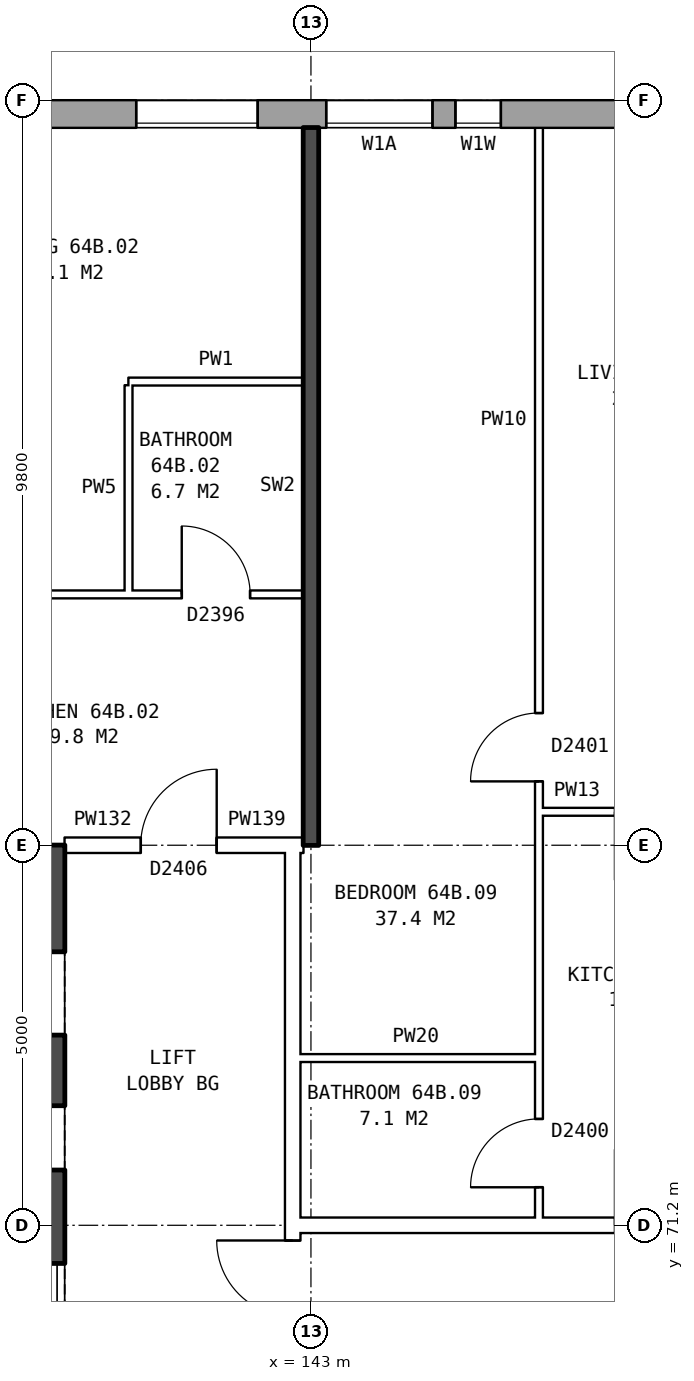
"""IFC4 building model, lengths in metres.
Left out: names, types, materials, properties, quantities, classifications, styles, units other than length and angle.
Written with IfcOpenShell. Run it as: python <this file> out.ifc"""

import sys

from ifc_helpers import new_model, si_unit, direction, frame, frame_2d, origin, place, context, subcontext, project, spatial, rectangle, extrude, element, fill, save


model = new_model("IFC4")
c1 = context("Model", 3, precision=1e-05, world=origin(), true_north=direction((0.0, 1.0)))
c2 = subcontext(c1, "Body", "Model", "MODEL_VIEW")
j1 = project(units=[si_unit("LENGTHUNIT", "METRE"), si_unit("PLANEANGLEUNIT", "RADIAN")], contexts=[c1])
p1 = place(None, origin())
s1 = spatial("IfcSite", under=j1, at=p1, CompositionType="ELEMENT")
p2 = place(p1, origin())
s2 = spatial("IfcBuilding", under=s1, at=p2, CompositionType="ELEMENT")
p3 = place(p2, frame((0.0, 0.0, 227.6)))
s3 = spatial("IfcBuildingStorey", under=s2, at=p3, CompositionType="ELEMENT", Elevation=227.6)
p4 = place(p3, frame((165.925, 85.82, 0.0), z_axis=(0.0, 0.0, 1.0), x_axis=(-1.0, 0.0, 0.0)))
e1 = element("IfcWall", 1, at=p4, inside=s3, PredefinedType="STANDARD", context=c2, shape_type="SweptSolid", body=[
    extrude(rectangle(XDim=33.875, YDim=0.36, at=frame_2d((16.938, 0.0))), origin(), (0.0, 0.0, 1.0), 2.85),
])
p5 = place(p4, frame((2.625, 0.0, 0.8)))
e2 = element("IfcOpeningElement", 2, at=p5, cuts=e1, PredefinedType="OPENING", context=c2, shape_type="SweptSolid", body=[
    extrude(rectangle(XDim=1.6, YDim=1.8, at=frame_2d((0.8, 0.9))), frame((0.0, 0.19, 0.0), z_axis=(0.0, -1.0, 0.0), x_axis=(1.0, 0.0, 0.0)), (0.0, 0.0, 1.0), 0.38),
])
p6 = place(p4, frame((5.625, 0.0, 0.8)))
e3 = element("IfcOpeningElement", 3, at=p6, cuts=e1, PredefinedType="OPENING", context=c2, shape_type="SweptSolid", body=[
    extrude(rectangle(XDim=1.6, YDim=1.8, at=frame_2d((0.8, 0.9))), frame((0.0, 0.19, 0.0), z_axis=(0.0, -1.0, 0.0), x_axis=(1.0, 0.0, 0.0)), (0.0, 0.0, 1.0), 0.38),
])
p7 = place(p4, frame((8.625, 0.0, 0.8)))
e4 = element("IfcOpeningElement", 4, at=p7, cuts=e1, PredefinedType="OPENING", context=c2, shape_type="SweptSolid", body=[
    extrude(rectangle(XDim=1.6, YDim=1.8, at=frame_2d((0.8, 0.9))), frame((0.0, 0.19, 0.0), z_axis=(0.0, -1.0, 0.0), x_axis=(1.0, 0.0, 0.0)), (0.0, 0.0, 1.0), 0.38),
])
p8 = place(p4, frame((12.675, 0.0, 0.15)))
e5 = element("IfcOpeningElement", 5, at=p8, cuts=e1, PredefinedType="OPENING", context=c2, shape_type="SweptSolid", body=[
    extrude(rectangle(XDim=1.0, YDim=1.8, at=frame_2d((0.5, 0.9))), frame((0.0, 0.19, 0.0), z_axis=(0.0, -1.0, 0.0), x_axis=(1.0, 0.0, 0.0)), (0.0, 0.0, 1.0), 0.38),
])
p9 = place(p4, frame((14.625, 0.0, 0.8)))
e6 = element("IfcOpeningElement", 6, at=p9, cuts=e1, PredefinedType="OPENING", context=c2, shape_type="SweptSolid", body=[
    extrude(rectangle(XDim=1.6, YDim=1.8, at=frame_2d((0.8, 0.9))), frame((0.0, 0.19, 0.0), z_axis=(0.0, -1.0, 0.0), x_axis=(1.0, 0.0, 0.0)), (0.0, 0.0, 1.0), 0.38),
])
p10 = place(p4, frame((17.125, 0.0, 0.8)))
e7 = element("IfcOpeningElement", 7, at=p10, cuts=e1, PredefinedType="OPENING", context=c2, shape_type="SweptSolid", body=[
    extrude(rectangle(XDim=1.6, YDim=1.8, at=frame_2d((0.8, 0.9))), frame((0.0, 0.19, 0.0), z_axis=(0.0, -1.0, 0.0), x_axis=(1.0, 0.0, 0.0)), (0.0, 0.0, 1.0), 0.38),
])
p11 = place(p4, frame((20.425, 0.0, 1.7)))
e8 = element("IfcOpeningElement", 8, at=p11, cuts=e1, PredefinedType="OPENING", context=c2, shape_type="SweptSolid", body=[
    extrude(rectangle(XDim=0.6, YDim=0.9, at=frame_2d((0.3, 0.45))), frame((0.0, 0.19, 0.0), z_axis=(0.0, -1.0, 0.0), x_axis=(1.0, 0.0, 0.0)), (0.0, 0.0, 1.0), 0.38),
])
p12 = place(p4, frame((23.625, 0.0, 0.8)))
e9 = element("IfcOpeningElement", 9, at=p12, cuts=e1, PredefinedType="OPENING", context=c2, shape_type="SweptSolid", body=[
    extrude(rectangle(XDim=1.6, YDim=1.8, at=frame_2d((0.8, 0.9))), frame((0.0, 0.19, 0.0), z_axis=(0.0, -1.0, 0.0), x_axis=(1.0, 0.0, 0.0)), (0.0, 0.0, 1.0), 0.38),
])
p13 = place(p4, frame((26.625, 0.0, 0.8)))
e10 = element("IfcOpeningElement", 10, at=p13, cuts=e1, PredefinedType="OPENING", context=c2, shape_type="SweptSolid", body=[
    extrude(rectangle(XDim=1.6, YDim=1.8, at=frame_2d((0.8, 0.9))), frame((0.0, 0.19, 0.0), z_axis=(0.0, -1.0, 0.0), x_axis=(1.0, 0.0, 0.0)), (0.0, 0.0, 1.0), 0.38),
])
p14 = place(p4, frame((29.625, 0.0, 0.8)))
e11 = element("IfcOpeningElement", 11, at=p14, cuts=e1, PredefinedType="OPENING", context=c2, shape_type="SweptSolid", body=[
    extrude(rectangle(XDim=1.6, YDim=1.8, at=frame_2d((0.8, 0.9))), frame((0.0, 0.19, 0.0), z_axis=(0.0, -1.0, 0.0), x_axis=(1.0, 0.0, 0.0)), (0.0, 0.0, 1.0), 0.38),
])
p15 = place(p4, frame((21.325, 0.0, 0.8)))
e12 = element("IfcOpeningElement", 12, at=p15, cuts=e1, PredefinedType="OPENING", context=c2, shape_type="SweptSolid", body=[
    extrude(rectangle(XDim=1.4, YDim=1.8, at=frame_2d((0.7, 0.9))), frame((0.0, 0.19, 0.0), z_axis=(0.0, -1.0, 0.0), x_axis=(1.0, 0.0, 0.0)), (0.0, 0.0, 1.0), 0.38),
])
p16 = place(p3, frame((139.56, 63.8, 0.0), z_axis=(0.0, 0.0, 1.0), x_axis=(0.0, 1.0, 0.0)))
e13 = element("IfcWall", 13, at=p16, inside=s3, PredefinedType="SHEAR", context=c2, shape_type="SweptSolid", body=[
    extrude(rectangle(XDim=12.4, YDim=0.4, at=frame_2d((6.2, 0.0))), origin(), (0.0, 0.0, 1.0), 2.85),
])
p17 = place(p16, frame((1.325, 0.0, 0.0)))
e14 = element("IfcOpeningElement", 14, at=p17, cuts=e13, PredefinedType="OPENING", context=c2, shape_type="SweptSolid", body=[
    extrude(rectangle(XDim=1.1, YDim=2.1, at=frame_2d((0.55, 1.05))), frame((0.0, 0.21, 0.0), z_axis=(0.0, -1.0, 0.0), x_axis=(1.0, 0.0, 0.0)), (0.0, 0.0, 1.0), 0.42),
])
p18 = place(p16, frame((3.6, 0.0, 0.0)))
e15 = element("IfcOpeningElement", 15, at=p18, cuts=e13, PredefinedType="OPENING", context=c2, shape_type="SweptSolid", body=[
    extrude(rectangle(XDim=1.1, YDim=2.1, at=frame_2d((0.55, 1.05))), frame((0.0, 0.21, 0.0), z_axis=(0.0, -1.0, 0.0), x_axis=(1.0, 0.0, 0.0)), (0.0, 0.0, 1.0), 0.42),
])
p19 = place(p16, frame((5.8, 0.0, 0.0)))
e16 = element("IfcOpeningElement", 16, at=p19, cuts=e13, PredefinedType="OPENING", context=c2, shape_type="SweptSolid", body=[
    extrude(rectangle(XDim=1.1, YDim=2.1, at=frame_2d((0.55, 1.05))), frame((0.0, 0.21, 0.0), z_axis=(0.0, -1.0, 0.0), x_axis=(1.0, 0.0, 0.0)), (0.0, 0.0, 1.0), 0.42),
])
p20 = place(p16, frame((9.9, 0.0, 0.0)))
e17 = element("IfcOpeningElement", 17, at=p20, cuts=e13, PredefinedType="OPENING", context=c2, shape_type="SweptSolid", body=[
    extrude(rectangle(XDim=1.1, YDim=2.1, at=frame_2d((0.55, 1.05))), frame((0.0, 0.21, 0.0), z_axis=(0.0, -1.0, 0.0), x_axis=(1.0, 0.0, 0.0)), (0.0, 0.0, 1.0), 0.42),
])
p21 = place(p16, frame((8.125, 0.0, 0.0)))
e18 = element("IfcOpeningElement", 18, at=p21, cuts=e13, PredefinedType="OPENING", context=c2, shape_type="SweptSolid", body=[
    extrude(rectangle(XDim=0.85, YDim=2.1, at=frame_2d((0.425, 1.05))), frame((0.0, 0.21, 0.0), z_axis=(0.0, -1.0, 0.0), x_axis=(1.0, 0.0, 0.0)), (0.0, 0.0, 1.0), 0.42),
])
p22 = place(p3, frame((142.76, 63.9, 0.0), z_axis=(0.0, 0.0, 1.0), x_axis=(0.0, 1.0, 0.0)))
e19 = element("IfcWall", 19, at=p22, inside=s3, PredefinedType="PARTITIONING", context=c2, shape_type="SweptSolid", body=[
    extrude(rectangle(XDim=12.2, YDim=0.2, at=frame_2d((6.1, 0.0))), origin(), (0.0, 0.0, 1.0), 2.85),
])
p23 = place(p22, frame((5.1, 0.0, 0.0)))
e20 = element("IfcOpeningElement", 20, at=p23, cuts=e19, PredefinedType="OPENING", context=c2, shape_type="SweptSolid", body=[
    extrude(rectangle(XDim=2.0, YDim=2.1, at=frame_2d((1.0, 1.05))), frame((0.0, 0.11, 0.0), z_axis=(0.0, -1.0, 0.0), x_axis=(1.0, 0.0, 0.0)), (0.0, 0.0, 1.0), 0.22),
])
p24 = place(p3, frame((142.76, 71.2, 0.0), z_axis=(0.0, 0.0, 1.0), x_axis=(1.0, 0.0, 0.0)))
e21 = element("IfcWall", 21, at=p24, inside=s3, PredefinedType="PARTITIONING", context=c2, shape_type="SweptSolid", body=[
    extrude(rectangle(XDim=14.48, YDim=0.2, at=frame_2d((7.24, 0.0))), origin(), (0.0, 0.0, 1.0), 2.85),
])
p25 = place(p24, frame((4.24, 0.0, 0.0)))
e22 = element("IfcOpeningElement", 22, at=p25, cuts=e21, PredefinedType="OPENING", context=c2, shape_type="SweptSolid", body=[
    extrude(rectangle(XDim=1.0, YDim=2.1, at=frame_2d((0.5, 1.05))), frame((0.0, 0.11, 0.0), z_axis=(0.0, -1.0, 0.0), x_axis=(1.0, 0.0, 0.0)), (0.0, 0.0, 1.0), 0.22),
])
p26 = place(p24, frame((10.24, 0.0, 0.0)))
e23 = element("IfcOpeningElement", 23, at=p26, cuts=e21, PredefinedType="OPENING", context=c2, shape_type="SweptSolid", body=[
    extrude(rectangle(XDim=1.0, YDim=2.1, at=frame_2d((0.5, 1.05))), frame((0.0, 0.11, 0.0), z_axis=(0.0, -1.0, 0.0), x_axis=(1.0, 0.0, 0.0)), (0.0, 0.0, 1.0), 0.22),
])
p27 = place(p3, frame((142.76, 73.4, 0.0), z_axis=(0.0, 0.0, 1.0), x_axis=(1.0, 0.0, 0.0)))
e24 = element("IfcWall", 24, at=p27, inside=s3, PredefinedType="PARTITIONING", context=c2, shape_type="SweptSolid", body=[
    extrude(rectangle(XDim=3.24, YDim=0.1, at=frame_2d((1.62, 0.0))), origin(), (0.0, 0.0, 1.0), 2.85),
])
p28 = place(p3, frame((139.76, 76.2, 0.0), z_axis=(0.0, 0.0, 1.0), x_axis=(1.0, 0.0, 0.0)))
e25 = element("IfcWall", 25, at=p28, inside=s3, PredefinedType="PARTITIONING", context=c2, shape_type="SweptSolid", body=[
    extrude(rectangle(XDim=3.0, YDim=0.2, at=frame_2d((1.5, 0.0))), origin(), (0.0, 0.0, 1.0), 2.85),
])
p29 = place(p28, frame((1.0, 0.0, 0.0)))
e26 = element("IfcOpeningElement", 26, at=p29, cuts=e25, PredefinedType="OPENING", context=c2, shape_type="SweptSolid", body=[
    extrude(rectangle(XDim=1.0, YDim=2.1, at=frame_2d((0.5, 1.05))), frame((0.0, 0.11, 0.0), z_axis=(0.0, -1.0, 0.0), x_axis=(1.0, 0.0, 0.0)), (0.0, 0.0, 1.0), 0.22),
])
p30 = place(p3, frame((142.76, 76.2, 0.0), z_axis=(0.0, 0.0, 1.0), x_axis=(1.0, 0.0, 0.0)))
e27 = element("IfcWall", 27, at=p30, inside=s3, PredefinedType="PARTITIONING", context=c2, shape_type="SweptSolid", body=[
    extrude(rectangle(XDim=0.14, YDim=0.2, at=frame_2d((0.07, 0.0))), origin(), (0.0, 0.0, 1.0), 2.85),
])
p31 = place(p3, frame((146.0, 76.64, 0.0), z_axis=(0.0, 0.0, 1.0), x_axis=(1.0, 0.0, 0.0)))
e28 = element("IfcWall", 28, at=p31, inside=s3, PredefinedType="PARTITIONING", context=c2, shape_type="SweptSolid", body=[
    extrude(rectangle(XDim=2.9, YDim=0.1, at=frame_2d((1.45, 0.0))), origin(), (0.0, 0.0, 1.0), 2.85),
])
p32 = place(p31, frame((1.0, 0.0, 0.0)))
e29 = element("IfcOpeningElement", 29, at=p32, cuts=e28, PredefinedType="OPENING", context=c2, shape_type="SweptSolid", body=[
    extrude(rectangle(XDim=0.9, YDim=2.1, at=frame_2d((0.45, 1.05))), frame((0.0, 0.06, 0.0), z_axis=(0.0, -1.0, 0.0), x_axis=(1.0, 0.0, 0.0)), (0.0, 0.0, 1.0), 0.12),
])
p33 = place(p3, frame((131.1, 79.5, 0.0), z_axis=(0.0, 0.0, 1.0), x_axis=(1.0, 0.0, 0.0)))
e30 = element("IfcWall", 30, at=p33, inside=s3, PredefinedType="PARTITIONING", context=c2, shape_type="SweptSolid", body=[
    extrude(rectangle(XDim=11.8, YDim=0.1, at=frame_2d((5.9, 0.0))), origin(), (0.0, 0.0, 1.0), 2.85),
])
p34 = place(p33, frame((7.25, 0.0, 0.0)))
e31 = element("IfcOpeningElement", 31, at=p34, cuts=e30, PredefinedType="OPENING", context=c2, shape_type="SweptSolid", body=[
    extrude(rectangle(XDim=0.9, YDim=2.1, at=frame_2d((0.45, 1.05))), frame((0.0, 0.06, 0.0), z_axis=(0.0, -1.0, 0.0), x_axis=(1.0, 0.0, 0.0)), (0.0, 0.0, 1.0), 0.12),
])
p35 = place(p33, frame((10.2, 0.0, 0.0)))
e32 = element("IfcOpeningElement", 32, at=p35, cuts=e30, PredefinedType="OPENING", context=c2, shape_type="SweptSolid", body=[
    extrude(rectangle(XDim=0.9, YDim=2.1, at=frame_2d((0.45, 1.05))), frame((0.0, 0.06, 0.0), z_axis=(0.0, -1.0, 0.0), x_axis=(1.0, 0.0, 0.0)), (0.0, 0.0, 1.0), 0.12),
])
p36 = place(p3, frame((140.6, 82.3, 0.0), z_axis=(0.0, 0.0, 1.0), x_axis=(1.0, 0.0, 0.0)))
e33 = element("IfcWall", 33, at=p36, inside=s3, PredefinedType="PARTITIONING", context=c2, shape_type="SweptSolid", body=[
    extrude(rectangle(XDim=2.3, YDim=0.1, at=frame_2d((1.15, 0.0))), origin(), (0.0, 0.0, 1.0), 2.85),
])
p37 = place(p3, frame((140.6, 79.55, 0.0), z_axis=(0.0, 0.0, 1.0), x_axis=(0.0, 1.0, 0.0)))
e34 = element("IfcWall", 34, at=p37, inside=s3, PredefinedType="PARTITIONING", context=c2, shape_type="SweptSolid", body=[
    extrude(rectangle(XDim=2.7, YDim=0.1, at=frame_2d((1.35, 0.0))), origin(), (0.0, 0.0, 1.0), 2.85),
])
p38 = place(p3, frame((143.0, 76.2, 0.0), z_axis=(0.0, 0.0, 1.0), x_axis=(0.0, 1.0, 0.0)))
e35 = element("IfcWall", 35, at=p38, inside=s3, PredefinedType="SOLIDWALL", context=c2, shape_type="SweptSolid", body=[
    extrude(rectangle(XDim=9.44, YDim=0.2, at=frame_2d((4.72, 0.0))), origin(), (0.0, 0.0, 1.0), 2.85),
])
p39 = place(p3, frame((146.0, 71.3, 0.0), z_axis=(0.0, 0.0, 1.0), x_axis=(0.0, 1.0, 0.0)))
e36 = element("IfcWall", 36, at=p39, inside=s3, PredefinedType="PARTITIONING", context=c2, shape_type="SweptSolid", body=[
    extrude(rectangle(XDim=14.34, YDim=0.1, at=frame_2d((7.17, 0.0))), origin(), (0.0, 0.0, 1.0), 2.85),
])
p40 = place(p39, frame((5.74, 0.0, 0.0)))
e37 = element("IfcOpeningElement", 37, at=p40, cuts=e36, PredefinedType="OPENING", context=c2, shape_type="SweptSolid", body=[
    extrude(rectangle(XDim=0.9, YDim=2.1, at=frame_2d((0.45, 1.05))), frame((0.0, 0.06, 0.0), z_axis=(0.0, -1.0, 0.0), x_axis=(1.0, 0.0, 0.0)), (0.0, 0.0, 1.0), 0.12),
])
p41 = place(p39, frame((0.4, 0.0, 0.0)))
e38 = element("IfcOpeningElement", 38, at=p41, cuts=e36, PredefinedType="OPENING", context=c2, shape_type="SweptSolid", body=[
    extrude(rectangle(XDim=0.9, YDim=2.1, at=frame_2d((0.45, 1.05))), frame((0.0, 0.06, 0.0), z_axis=(0.0, -1.0, 0.0), x_axis=(1.0, 0.0, 0.0)), (0.0, 0.0, 1.0), 0.12),
])
p42 = place(p11, origin())
e39 = element("IfcWindow", 39, at=p42, inside=s3, PartitioningType="SINGLE_PANEL", PredefinedType="WINDOW", context=c2, shape_type="SweptSolid", body=[
    extrude(rectangle(XDim=0.6, YDim=0.9, at=frame_2d((0.3, 0.45))), frame((0.0, 0.15, 0.0), z_axis=(0.0, -1.0, 0.0), x_axis=(1.0, 0.0, 0.0)), (0.0, 0.0, 1.0), 0.06),
])
fill(e8, e39)
p43 = place(p12, origin())
e40 = element("IfcWindow", 40, at=p43, inside=s3, PartitioningType="SINGLE_PANEL", PredefinedType="WINDOW", context=c2, shape_type="SweptSolid", body=[
    extrude(rectangle(XDim=1.6, YDim=1.8, at=frame_2d((0.8, 0.9))), frame((0.0, 0.15, 0.0), z_axis=(0.0, -1.0, 0.0), x_axis=(1.0, 0.0, 0.0)), (0.0, 0.0, 1.0), 0.06),
])
fill(e9, e40)
p44 = place(p23, origin())
e41 = element("IfcDoor", 41, at=p44, inside=s3, OperationType="DOUBLE_DOOR_SINGLE_SWING", PredefinedType="DOOR", context=c2, shape_type="SweptSolid", body=[
    extrude(rectangle(XDim=2.0, YDim=2.1, at=frame_2d((1.0, 1.05))), frame((0.0, 0.025, 0.0), z_axis=(0.0, -1.0, 0.0), x_axis=(1.0, 0.0, 0.0)), (0.0, 0.0, 1.0), 0.05),
])
fill(e20, e41)
p45 = place(p29, origin())
e42 = element("IfcDoor", 42, at=p45, inside=s3, OperationType="SINGLE_SWING_RIGHT", PredefinedType="DOOR", context=c2, shape_type="SweptSolid", body=[
    extrude(rectangle(XDim=1.0, YDim=2.1, at=frame_2d((0.5, 1.05))), frame((0.0, 0.025, 0.0), z_axis=(0.0, -1.0, 0.0), x_axis=(1.0, 0.0, 0.0)), (0.0, 0.0, 1.0), 0.05),
])
fill(e26, e42)
p46 = place(p35, origin())
e43 = element("IfcDoor", 43, at=p46, inside=s3, OperationType="SINGLE_SWING_LEFT", PredefinedType="DOOR", context=c2, shape_type="SweptSolid", body=[
    extrude(rectangle(XDim=0.9, YDim=2.1, at=frame_2d((0.45, 1.05))), frame((0.0, 0.025, 0.0), z_axis=(0.0, -1.0, 0.0), x_axis=(1.0, 0.0, 0.0)), (0.0, 0.0, 1.0), 0.05),
])
fill(e32, e43)
p47 = place(p40, origin())
e44 = element("IfcDoor", 44, at=p47, inside=s3, OperationType="SINGLE_SWING_LEFT", PredefinedType="DOOR", context=c2, shape_type="SweptSolid", body=[
    extrude(rectangle(XDim=0.9, YDim=2.1, at=frame_2d((0.45, 1.05))), frame((0.0, 0.025, 0.0), z_axis=(0.0, -1.0, 0.0), x_axis=(1.0, 0.0, 0.0)), (0.0, 0.0, 1.0), 0.05),
])
fill(e37, e44)
p48 = place(p41, origin())
e45 = element("IfcDoor", 45, at=p48, inside=s3, OperationType="SINGLE_SWING_LEFT", PredefinedType="DOOR", context=c2, shape_type="SweptSolid", body=[
    extrude(rectangle(XDim=0.9, YDim=2.1, at=frame_2d((0.45, 1.05))), frame((0.0, 0.025, 0.0), z_axis=(0.0, -1.0, 0.0), x_axis=(1.0, 0.0, 0.0)), (0.0, 0.0, 1.0), 0.05),
])
fill(e38, e45)
p49 = place(p15, origin())
e46 = element("IfcWindow", 46, at=p49, inside=s3, PartitioningType="SINGLE_PANEL", PredefinedType="WINDOW", context=c2, shape_type="SweptSolid", body=[
    extrude(rectangle(XDim=1.4, YDim=1.8, at=frame_2d((0.7, 0.9))), frame((0.0, 0.15, 0.0), z_axis=(0.0, -1.0, 0.0), x_axis=(1.0, 0.0, 0.0)), (0.0, 0.0, 1.0), 0.06),
])
fill(e12, e46)
save(model, sys.argv[1])
